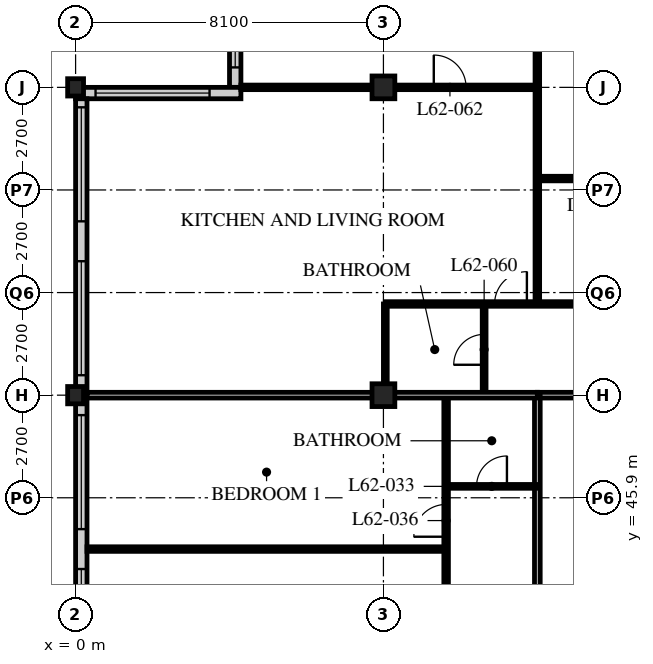
"""IFC4 building model, lengths in metres.
Left out: names, types, materials, properties, quantities, classifications, styles, units other than length and angle.
Written with IfcOpenShell. Run it as: python <this file> out.ifc"""

import sys

from ifc_helpers import new_model, si_unit, direction, frame, frame_2d, origin, origin_2d, place, context, subcontext, project, spatial, rectangle, hollow_rectangle, i_section, extrude, element, fill, save


model = new_model("IFC4")
c1 = context("Model", 3, precision=1e-05, world=origin(), true_north=direction((0.0, 1.0)))
c2 = subcontext(c1, "Body", "Model", "MODEL_VIEW")
j1 = project(units=[si_unit("LENGTHUNIT", "METRE"), si_unit("PLANEANGLEUNIT", "RADIAN")], contexts=[c1])
p1 = place(None, origin())
s1 = spatial("IfcSite", under=j1, at=p1, CompositionType="ELEMENT")
p2 = place(p1, origin())
s2 = spatial("IfcBuilding", under=s1, at=p2, CompositionType="ELEMENT")
p3 = place(p2, frame((0.0, 0.0, 242.4)))
s3 = spatial("IfcBuildingStorey", under=s2, at=p3, CompositionType="ELEMENT", Elevation=242.4)
for number, where, z_axis, x_axis in (
    (1, (0.0, 48.6, 0.0), (0.0, 0.0, 1.0), (1.0, 0.0, 0.0)),
    (2, (0.0, 56.7, 0.0), (0.0, 0.0, 1.0), (1.0, 0.0, 0.0)),
):
    element("IfcColumn", number, at=place(p3, frame(where, z_axis=z_axis, x_axis=x_axis)), inside=s3, PredefinedType="COLUMN", context=c2, shape_type="SweptSolid", body=[
        extrude(i_section(OverallWidth=0.418, OverallDepth=0.456, WebThickness=0.042, FlangeThickness=0.067, FilletRadius=0.015, at=origin_2d()), origin(), (0.0, 0.0, 1.0), 3.9),
    ])
for number, where, z_axis, x_axis in (
    (3, (8.1, 48.6, 0.0), (0.0, 0.0, 1.0), (1.0, 0.0, 0.0)),
    (4, (8.1, 56.7, 0.0), (0.0, 0.0, 1.0), (1.0, 0.0, 0.0)),
):
    element("IfcColumn", number, at=place(p3, frame(where, z_axis=z_axis, x_axis=x_axis)), inside=s3, PredefinedType="COLUMN", context=c2, shape_type="SweptSolid", body=[
        extrude(hollow_rectangle(XDim=0.6, YDim=0.6, WallThickness=0.05, at=origin_2d()), origin(), (0.0, 0.0, 1.0), 3.9),
    ])
p4 = place(p3, frame((4.2, 60.45, 0.0), z_axis=(0.0, 0.0, 1.0), x_axis=(0.0, -1.0, 0.0)))
e5 = element("IfcWall", 5, at=p4, inside=s3, PredefinedType="SOLIDWALL", context=c2, shape_type="SweptSolid", body=[
    extrude(rectangle(XDim=3.75, YDim=0.3, at=frame_2d((1.875, 0.0))), origin(), (0.0, 0.0, 1.0), 3.69),
])
p5 = place(p4, frame((0.225, 0.0, 0.6)))
e6 = element("IfcOpeningElement", 6, at=p5, cuts=e5, PredefinedType="OPENING", context=c2, shape_type="SweptSolid", body=[
    extrude(rectangle(XDim=3.0, YDim=2.3, at=frame_2d((1.5, 1.15))), frame((0.0, 0.16, 0.0), z_axis=(0.0, -1.0, 0.0), x_axis=(1.0, 0.0, 0.0)), (0.0, 0.0, 1.0), 0.32),
])
p6 = place(p3, frame((4.35, 56.55, 0.0), z_axis=(0.0, 0.0, 1.0), x_axis=(-1.0, 0.0, 0.0)))
e7 = element("IfcWall", 7, at=p6, inside=s3, PredefinedType="SOLIDWALL", context=c2, shape_type="SweptSolid", body=[
    extrude(rectangle(XDim=4.35, YDim=0.3, at=frame_2d((2.175, 0.0))), origin(), (0.0, 0.0, 1.0), 3.69),
])
p7 = place(p6, frame((0.825, 0.0, 0.6)))
e8 = element("IfcOpeningElement", 8, at=p7, cuts=e7, PredefinedType="OPENING", context=c2, shape_type="SweptSolid", body=[
    extrude(rectangle(XDim=3.0, YDim=2.3, at=frame_2d((1.5, 1.15))), frame((0.0, 0.16, 0.0), z_axis=(0.0, -1.0, 0.0), x_axis=(1.0, 0.0, 0.0)), (0.0, 0.0, 1.0), 0.32),
])
p8 = place(p3, frame((0.15, 56.4, 0.0), z_axis=(0.0, 0.0, 1.0), x_axis=(0.0, -1.0, 0.0)))
e9 = element("IfcWall", 9, at=p8, inside=s3, PredefinedType="SOLIDWALL", context=c2, shape_type="SweptSolid", body=[
    extrude(rectangle(XDim=32.1, YDim=0.3, at=frame_2d((16.05, 0.0))), origin(), (0.0, 0.0, 1.0), 3.69),
])
p9 = place(p8, frame((0.225, 0.0, 0.6)))
e10 = element("IfcOpeningElement", 10, at=p9, cuts=e9, PredefinedType="OPENING", context=c2, shape_type="SweptSolid", body=[
    extrude(rectangle(XDim=3.0, YDim=2.3, at=frame_2d((1.5, 1.15))), frame((0.0, 0.16, 0.0), z_axis=(0.0, -1.0, 0.0), x_axis=(1.0, 0.0, 0.0)), (0.0, 0.0, 1.0), 0.32),
])
p10 = place(p8, frame((4.275, 0.0, 0.6)))
e11 = element("IfcOpeningElement", 11, at=p10, cuts=e9, PredefinedType="OPENING", context=c2, shape_type="SweptSolid", body=[
    extrude(rectangle(XDim=3.0, YDim=2.3, at=frame_2d((1.5, 1.15))), frame((0.0, 0.16, 0.0), z_axis=(0.0, -1.0, 0.0), x_axis=(1.0, 0.0, 0.0)), (0.0, 0.0, 1.0), 0.32),
])
p11 = place(p8, frame((8.325, 0.0, 0.6)))
e12 = element("IfcOpeningElement", 12, at=p11, cuts=e9, PredefinedType="OPENING", context=c2, shape_type="SweptSolid", body=[
    extrude(rectangle(XDim=3.0, YDim=2.3, at=frame_2d((1.5, 1.15))), frame((0.0, 0.16, 0.0), z_axis=(0.0, -1.0, 0.0), x_axis=(1.0, 0.0, 0.0)), (0.0, 0.0, 1.0), 0.32),
])
p12 = place(p8, frame((12.375, 0.0, 0.6)))
e13 = element("IfcOpeningElement", 13, at=p12, cuts=e9, PredefinedType="OPENING", context=c2, shape_type="SweptSolid", body=[
    extrude(rectangle(XDim=3.0, YDim=2.3, at=frame_2d((1.5, 1.15))), frame((0.0, 0.16, 0.0), z_axis=(0.0, -1.0, 0.0), x_axis=(1.0, 0.0, 0.0)), (0.0, 0.0, 1.0), 0.32),
])
p13 = place(p8, frame((16.425, 0.0, 0.6)))
e14 = element("IfcOpeningElement", 14, at=p13, cuts=e9, PredefinedType="OPENING", context=c2, shape_type="SweptSolid", body=[
    extrude(rectangle(XDim=3.0, YDim=2.3, at=frame_2d((1.5, 1.15))), frame((0.0, 0.16, 0.0), z_axis=(0.0, -1.0, 0.0), x_axis=(1.0, 0.0, 0.0)), (0.0, 0.0, 1.0), 0.32),
])
p14 = place(p8, frame((20.475, 0.0, 0.6)))
e15 = element("IfcOpeningElement", 15, at=p14, cuts=e9, PredefinedType="OPENING", context=c2, shape_type="SweptSolid", body=[
    extrude(rectangle(XDim=3.0, YDim=2.3, at=frame_2d((1.5, 1.15))), frame((0.0, 0.16, 0.0), z_axis=(0.0, -1.0, 0.0), x_axis=(1.0, 0.0, 0.0)), (0.0, 0.0, 1.0), 0.32),
])
p15 = place(p8, frame((24.525, 0.0, 0.6)))
e16 = element("IfcOpeningElement", 16, at=p15, cuts=e9, PredefinedType="OPENING", context=c2, shape_type="SweptSolid", body=[
    extrude(rectangle(XDim=3.0, YDim=2.3, at=frame_2d((1.5, 1.15))), frame((0.0, 0.16, 0.0), z_axis=(0.0, -1.0, 0.0), x_axis=(1.0, 0.0, 0.0)), (0.0, 0.0, 1.0), 0.32),
])
p16 = place(p8, frame((28.575, 0.0, 0.6)))
e17 = element("IfcOpeningElement", 17, at=p16, cuts=e9, PredefinedType="OPENING", context=c2, shape_type="SweptSolid", body=[
    extrude(rectangle(XDim=3.0, YDim=2.3, at=frame_2d((1.5, 1.15))), frame((0.0, 0.16, 0.0), z_axis=(0.0, -1.0, 0.0), x_axis=(1.0, 0.0, 0.0)), (0.0, 0.0, 1.0), 0.32),
])
p17 = place(p3, frame((12.15, 48.6, 0.0), z_axis=(0.0, 0.0, 1.0), x_axis=(1.0, 0.0, 0.0)))
e18 = element("IfcWall", 18, at=p17, inside=s3, PredefinedType="PARTITIONING", context=c2, shape_type="SweptSolid", body=[
    extrude(rectangle(XDim=32.4, YDim=0.15, at=frame_2d((16.2, 0.0))), origin(), (0.0, 0.0, 1.0), 2.928),
])
p18 = place(p17, frame((4.95, 0.0, 0.0)))
e19 = element("IfcOpeningElement", 19, at=p18, cuts=e18, PredefinedType="OPENING", context=c2, shape_type="SweptSolid", body=[
    extrude(rectangle(XDim=1.0, YDim=2.1, at=frame_2d((0.5, 1.05))), frame((0.0, 0.085, 0.0), z_axis=(0.0, -1.0, 0.0), x_axis=(1.0, 0.0, 0.0)), (0.0, 0.0, 1.0), 0.17),
])
p19 = place(p17, frame((21.15, 0.0, 0.0)))
e20 = element("IfcOpeningElement", 20, at=p19, cuts=e18, PredefinedType="OPENING", context=c2, shape_type="SweptSolid", body=[
    extrude(rectangle(XDim=1.0, YDim=2.1, at=frame_2d((0.5, 1.05))), frame((0.0, 0.085, 0.0), z_axis=(0.0, -1.0, 0.0), x_axis=(1.0, 0.0, 0.0)), (0.0, 0.0, 1.0), 0.17),
])
p20 = place(p17, frame((29.875, 0.0, 0.0)))
e21 = element("IfcOpeningElement", 21, at=p20, cuts=e18, PredefinedType="OPENING", context=c2, shape_type="SweptSolid", body=[
    extrude(rectangle(XDim=1.0, YDim=2.1, at=frame_2d((0.5, 1.05))), frame((0.0, 0.085, 0.0), z_axis=(0.0, -1.0, 0.0), x_axis=(1.0, 0.0, 0.0)), (0.0, 0.0, 1.0), 0.17),
])
p21 = place(p17, frame((1.525, 0.0, 0.0)))
e22 = element("IfcOpeningElement", 22, at=p21, cuts=e18, PredefinedType="OPENING", context=c2, shape_type="SweptSolid", body=[
    extrude(rectangle(XDim=1.0, YDim=2.1, at=frame_2d((0.5, 1.05))), frame((0.0, 0.085, 0.0), z_axis=(0.0, -1.0, 0.0), x_axis=(1.0, 0.0, 0.0)), (0.0, 0.0, 1.0), 0.17),
])
p22 = place(p3, frame((12.15, 22.5, 0.0), z_axis=(0.0, 0.0, 1.0), x_axis=(0.0, 1.0, 0.0)))
e23 = element("IfcWall", 23, at=p22, inside=s3, PredefinedType="PARTITIONING", context=c2, shape_type="SweptSolid", body=[
    extrude(rectangle(XDim=26.1, YDim=0.15, at=frame_2d((13.05, 0.0))), origin(), (0.0, 0.0, 1.0), 3.69),
])
p23 = place(p22, frame((0.4, 0.0, 0.0)))
e24 = element("IfcOpeningElement", 24, at=p23, cuts=e23, PredefinedType="OPENING", context=c2, shape_type="SweptSolid", body=[
    extrude(rectangle(XDim=1.0, YDim=2.1, at=frame_2d((0.5, 1.05))), frame((0.0, 0.085, 0.0), z_axis=(0.0, -1.0, 0.0), x_axis=(1.0, 0.0, 0.0)), (0.0, 0.0, 1.0), 0.17),
])
p24 = place(p22, frame((14.35, 0.0, 0.0)))
e25 = element("IfcOpeningElement", 25, at=p24, cuts=e23, PredefinedType="OPENING", context=c2, shape_type="SweptSolid", body=[
    extrude(rectangle(XDim=1.0, YDim=2.1, at=frame_2d((0.5, 1.05))), frame((0.0, 0.085, 0.0), z_axis=(0.0, -1.0, 0.0), x_axis=(1.0, 0.0, 0.0)), (0.0, 0.0, 1.0), 0.17),
])
p25 = place(p3, frame((9.75, 22.5, 0.0), z_axis=(0.0, 0.0, 1.0), x_axis=(0.0, 1.0, 0.0)))
e26 = element("IfcWall", 26, at=p25, inside=s3, PredefinedType="PARTITIONING", context=c2, shape_type="SweptSolid", body=[
    extrude(rectangle(XDim=26.1, YDim=0.12, at=frame_2d((13.05, 0.0))), origin(), (0.0, 0.0, 1.0), 3.69),
])
p26 = place(p25, frame((0.975, 0.0, 0.0)))
e27 = element("IfcOpeningElement", 27, at=p26, cuts=e26, PredefinedType="OPENING", context=c2, shape_type="SweptSolid", body=[
    extrude(rectangle(XDim=0.85, YDim=2.1, at=frame_2d((0.425, 1.05))), frame((0.0, 0.07, 0.0), z_axis=(0.0, -1.0, 0.0), x_axis=(1.0, 0.0, 0.0)), (0.0, 0.0, 1.0), 0.14),
])
p27 = place(p25, frame((10.225, 0.0, 0.0)))
e28 = element("IfcOpeningElement", 28, at=p27, cuts=e26, PredefinedType="OPENING", context=c2, shape_type="SweptSolid", body=[
    extrude(rectangle(XDim=0.85, YDim=2.1, at=frame_2d((0.425, 1.05))), frame((0.0, 0.07, 0.0), z_axis=(0.0, -1.0, 0.0), x_axis=(1.0, 0.0, 0.0)), (0.0, 0.0, 1.0), 0.14),
])
p28 = place(p25, frame((14.925, 0.0, 0.0)))
e29 = element("IfcOpeningElement", 29, at=p28, cuts=e26, PredefinedType="OPENING", context=c2, shape_type="SweptSolid", body=[
    extrude(rectangle(XDim=0.85, YDim=2.1, at=frame_2d((0.425, 1.05))), frame((0.0, 0.07, 0.0), z_axis=(0.0, -1.0, 0.0), x_axis=(1.0, 0.0, 0.0)), (0.0, 0.0, 1.0), 0.14),
])
p29 = place(p25, frame((22.375, 0.0, 0.0)))
e30 = element("IfcOpeningElement", 30, at=p29, cuts=e26, PredefinedType="OPENING", context=c2, shape_type="SweptSolid", body=[
    extrude(rectangle(XDim=0.85, YDim=2.1, at=frame_2d((0.425, 1.05))), frame((0.0, 0.07, 0.0), z_axis=(0.0, -1.0, 0.0), x_axis=(1.0, 0.0, 0.0)), (0.0, 0.0, 1.0), 0.14),
])
p30 = place(p3, frame((12.15, 46.2, 0.0), z_axis=(0.0, 0.0, 1.0), x_axis=(-1.0, 0.0, 0.0)))
e31 = element("IfcWall", 31, at=p30, inside=s3, PredefinedType="PARTITIONING", context=c2, shape_type="SweptSolid", body=[
    extrude(rectangle(XDim=2.4, YDim=0.1, at=frame_2d((1.2, 0.0))), origin(), (0.0, 0.0, 1.0), 3.69),
])
p31 = place(p30, frame((0.8, 0.0, 0.0)))
e32 = element("IfcOpeningElement", 32, at=p31, cuts=e31, PredefinedType="OPENING", context=c2, shape_type="SweptSolid", body=[
    extrude(rectangle(XDim=0.8, YDim=2.1, at=frame_2d((0.4, 1.05))), frame((0.0, 0.06, 0.0), z_axis=(0.0, -1.0, 0.0), x_axis=(1.0, 0.0, 0.0)), (0.0, 0.0, 1.0), 0.12),
])
p32 = place(p3, frame((9.75, 44.55, 0.0), z_axis=(0.0, 0.0, 1.0), x_axis=(-1.0, 0.0, 0.0)))
e33 = element("IfcWall", 33, at=p32, inside=s3, PredefinedType="PARTITIONING", context=c2, shape_type="SweptSolid", body=[
    extrude(rectangle(XDim=9.45, YDim=0.12, at=frame_2d((4.725, 0.0))), origin(), (0.0, 0.0, 1.0), 3.69),
])
p33 = place(p3, frame((10.75, 48.6, 0.0), z_axis=(0.0, 0.0, 1.0), x_axis=(0.0, 1.0, 0.0)))
e34 = element("IfcWall", 34, at=p33, inside=s3, PredefinedType="PARTITIONING", context=c2, shape_type="SweptSolid", body=[
    extrude(rectangle(XDim=2.4, YDim=0.1, at=frame_2d((1.2, 0.0))), origin(), (0.0, 0.0, 1.0), 3.69),
])
p34 = place(p33, frame((0.8, 0.0, 0.0)))
e35 = element("IfcOpeningElement", 35, at=p34, cuts=e34, PredefinedType="OPENING", context=c2, shape_type="SweptSolid", body=[
    extrude(rectangle(XDim=0.8, YDim=2.1, at=frame_2d((0.4, 1.05))), frame((0.0, 0.06, 0.0), z_axis=(0.0, -1.0, 0.0), x_axis=(1.0, 0.0, 0.0)), (0.0, 0.0, 1.0), 0.12),
])
p35 = place(p3, frame((8.15, 48.6, 0.0), z_axis=(0.0, 0.0, 1.0), x_axis=(0.0, 1.0, 0.0)))
e36 = element("IfcWall", 36, at=p35, inside=s3, PredefinedType="PARTITIONING", context=c2, shape_type="SweptSolid", body=[
    extrude(rectangle(XDim=2.4, YDim=0.1, at=frame_2d((1.2, 0.0))), origin(), (0.0, 0.0, 1.0), 2.928),
])
p36 = place(p3, frame((8.15, 51.0, 0.0), z_axis=(0.0, 0.0, 1.0), x_axis=(1.0, 0.0, 0.0)))
e37 = element("IfcWall", 37, at=p36, inside=s3, PredefinedType="PARTITIONING", context=c2, shape_type="SweptSolid", body=[
    extrude(rectangle(XDim=40.4, YDim=0.12, at=frame_2d((20.2, 0.0))), origin(), (0.0, 0.0, 1.0), 3.69),
])
p37 = place(p36, frame((9.025, 0.0, 0.0)))
e38 = element("IfcOpeningElement", 38, at=p37, cuts=e37, PredefinedType="OPENING", context=c2, shape_type="SweptSolid", body=[
    extrude(rectangle(XDim=0.85, YDim=2.1, at=frame_2d((0.425, 1.05))), frame((0.0, 0.07, 0.0), z_axis=(0.0, -1.0, 0.0), x_axis=(1.0, 0.0, 0.0)), (0.0, 0.0, 1.0), 0.14),
])
p38 = place(p36, frame((16.475, 0.0, 0.0)))
e39 = element("IfcOpeningElement", 39, at=p38, cuts=e37, PredefinedType="OPENING", context=c2, shape_type="SweptSolid", body=[
    extrude(rectangle(XDim=0.85, YDim=2.1, at=frame_2d((0.425, 1.05))), frame((0.0, 0.07, 0.0), z_axis=(0.0, -1.0, 0.0), x_axis=(1.0, 0.0, 0.0)), (0.0, 0.0, 1.0), 0.14),
])
p39 = place(p36, frame((20.525, 0.0, 0.0)))
e40 = element("IfcOpeningElement", 40, at=p39, cuts=e37, PredefinedType="OPENING", context=c2, shape_type="SweptSolid", body=[
    extrude(rectangle(XDim=0.85, YDim=2.1, at=frame_2d((0.425, 1.05))), frame((0.0, 0.07, 0.0), z_axis=(0.0, -1.0, 0.0), x_axis=(1.0, 0.0, 0.0)), (0.0, 0.0, 1.0), 0.14),
])
p40 = place(p36, frame((25.225, 0.0, 0.0)))
e41 = element("IfcOpeningElement", 41, at=p40, cuts=e37, PredefinedType="OPENING", context=c2, shape_type="SweptSolid", body=[
    extrude(rectangle(XDim=0.85, YDim=2.1, at=frame_2d((0.425, 1.05))), frame((0.0, 0.07, 0.0), z_axis=(0.0, -1.0, 0.0), x_axis=(1.0, 0.0, 0.0)), (0.0, 0.0, 1.0), 0.14),
])
p41 = place(p36, frame((28.625, 0.0, 0.0)))
e42 = element("IfcOpeningElement", 42, at=p41, cuts=e37, PredefinedType="OPENING", context=c2, shape_type="SweptSolid", body=[
    extrude(rectangle(XDim=0.85, YDim=2.1, at=frame_2d((0.425, 1.05))), frame((0.0, 0.07, 0.0), z_axis=(0.0, -1.0, 0.0), x_axis=(1.0, 0.0, 0.0)), (0.0, 0.0, 1.0), 0.14),
])
p42 = place(p36, frame((32.825, 0.0, 0.0)))
e43 = element("IfcOpeningElement", 43, at=p42, cuts=e37, PredefinedType="OPENING", context=c2, shape_type="SweptSolid", body=[
    extrude(rectangle(XDim=0.85, YDim=2.1, at=frame_2d((0.425, 1.05))), frame((0.0, 0.07, 0.0), z_axis=(0.0, -1.0, 0.0), x_axis=(1.0, 0.0, 0.0)), (0.0, 0.0, 1.0), 0.14),
])
p43 = place(p36, frame((36.675, 0.0, 0.0)))
e44 = element("IfcOpeningElement", 44, at=p43, cuts=e37, PredefinedType="OPENING", context=c2, shape_type="SweptSolid", body=[
    extrude(rectangle(XDim=0.85, YDim=2.1, at=frame_2d((0.425, 1.05))), frame((0.0, 0.07, 0.0), z_axis=(0.0, -1.0, 0.0), x_axis=(1.0, 0.0, 0.0)), (0.0, 0.0, 1.0), 0.14),
])
p44 = place(p36, frame((6.725, 0.0, 0.0)))
e45 = element("IfcOpeningElement", 45, at=p44, cuts=e37, PredefinedType="OPENING", context=c2, shape_type="SweptSolid", body=[
    extrude(rectangle(XDim=0.85, YDim=2.1, at=frame_2d((0.425, 1.05))), frame((0.0, 0.07, 0.0), z_axis=(0.0, -1.0, 0.0), x_axis=(1.0, 0.0, 0.0)), (0.0, 0.0, 1.0), 0.14),
])
p45 = place(p36, frame((2.875, 0.0, 0.0)))
e46 = element("IfcOpeningElement", 46, at=p45, cuts=e37, PredefinedType="OPENING", context=c2, shape_type="SweptSolid", body=[
    extrude(rectangle(XDim=0.85, YDim=2.1, at=frame_2d((0.425, 1.05))), frame((0.0, 0.07, 0.0), z_axis=(0.0, -1.0, 0.0), x_axis=(1.0, 0.0, 0.0)), (0.0, 0.0, 1.0), 0.14),
])
p46 = place(p3, frame((12.15, 51.0, 0.0), z_axis=(0.0, 0.0, 1.0), x_axis=(0.0, 1.0, 0.0)))
e47 = element("IfcWall", 47, at=p46, inside=s3, PredefinedType="PARTITIONING", context=c2, shape_type="SweptSolid", body=[
    extrude(rectangle(XDim=13.5, YDim=0.12, at=frame_2d((6.75, 0.0))), origin(), (0.0, 0.0, 1.0), 3.69),
])
p47 = place(p3, frame((12.15, 56.7, 0.0), z_axis=(0.0, 0.0, 1.0), x_axis=(-1.0, 0.0, 0.0)))
e48 = element("IfcWall", 48, at=p47, inside=s3, PredefinedType="PARTITIONING", context=c2, shape_type="SweptSolid", body=[
    extrude(rectangle(XDim=7.8, YDim=0.12, at=frame_2d((3.9, 0.0))), origin(), (0.0, 0.0, 1.0), 2.928),
])
p48 = place(p47, frame((1.875, 0.0, 0.0)))
e49 = element("IfcOpeningElement", 49, at=p48, cuts=e48, PredefinedType="OPENING", context=c2, shape_type="SweptSolid", body=[
    extrude(rectangle(XDim=0.85, YDim=2.1, at=frame_2d((0.425, 1.05))), frame((0.0, 0.07, 0.0), z_axis=(0.0, -1.0, 0.0), x_axis=(1.0, 0.0, 0.0)), (0.0, 0.0, 1.0), 0.14),
])
p49 = place(p3, frame((0.3, 48.6, 0.0), z_axis=(0.0, 0.0, 1.0), x_axis=(1.0, 0.0, 0.0)))
e50 = element("IfcWall", 50, at=p49, inside=s3, PredefinedType="PARTITIONING", context=c2, shape_type="SweptSolid", body=[
    extrude(rectangle(XDim=11.85, YDim=0.15, at=frame_2d((5.925, 0.0))), origin(), (0.0, 0.0, 1.0), 2.928),
])
p50 = place(p3, frame((12.15, 54.3, 0.0), z_axis=(0.0, 0.0, 1.0), x_axis=(1.0, 0.0, 0.0)))
e51 = element("IfcWall", 51, at=p50, inside=s3, PredefinedType="PARTITIONING", context=c2, shape_type="SweptSolid", body=[
    extrude(rectangle(XDim=4.05, YDim=0.12, at=frame_2d((2.025, 0.0))), origin(), (0.0, 0.0, 1.0), 3.69),
])
p51 = place(p50, frame((1.6, 0.0, 0.0)))
e52 = element("IfcOpeningElement", 52, at=p51, cuts=e51, PredefinedType="OPENING", context=c2, shape_type="SweptSolid", body=[
    extrude(rectangle(XDim=0.85, YDim=2.1, at=frame_2d((0.425, 1.05))), frame((0.0, 0.07, 0.0), z_axis=(0.0, -1.0, 0.0), x_axis=(1.0, 0.0, 0.0)), (0.0, 0.0, 1.0), 0.14),
])
p52 = place(p5, origin())
e53 = element("IfcWindow", 53, at=p52, inside=s3, PartitioningType="SINGLE_PANEL", PredefinedType="WINDOW", context=c2, shape_type="SweptSolid", body=[
    extrude(rectangle(XDim=3.0, YDim=2.3, at=frame_2d((1.5, 1.15))), frame((0.0, 0.03, 0.0), z_axis=(0.0, -1.0, 0.0), x_axis=(1.0, 0.0, 0.0)), (0.0, 0.0, 1.0), 0.06),
])
fill(e6, e53)
p53 = place(p7, origin())
e54 = element("IfcWindow", 54, at=p53, inside=s3, PartitioningType="SINGLE_PANEL", PredefinedType="WINDOW", context=c2, shape_type="SweptSolid", body=[
    extrude(rectangle(XDim=3.0, YDim=2.3, at=frame_2d((1.5, 1.15))), frame((0.0, 0.03, 0.0), z_axis=(0.0, -1.0, 0.0), x_axis=(1.0, 0.0, 0.0)), (0.0, 0.0, 1.0), 0.06),
])
fill(e8, e54)
p54 = place(p9, origin())
e55 = element("IfcWindow", 55, at=p54, inside=s3, PartitioningType="SINGLE_PANEL", PredefinedType="WINDOW", context=c2, shape_type="SweptSolid", body=[
    extrude(rectangle(XDim=3.0, YDim=2.3, at=frame_2d((1.5, 1.15))), frame((0.0, 0.03, 0.0), z_axis=(0.0, -1.0, 0.0), x_axis=(1.0, 0.0, 0.0)), (0.0, 0.0, 1.0), 0.06),
])
fill(e10, e55)
p55 = place(p10, origin())
e56 = element("IfcWindow", 56, at=p55, inside=s3, PartitioningType="SINGLE_PANEL", PredefinedType="WINDOW", context=c2, shape_type="SweptSolid", body=[
    extrude(rectangle(XDim=3.0, YDim=2.3, at=frame_2d((1.5, 1.15))), frame((0.0, 0.03, 0.0), z_axis=(0.0, -1.0, 0.0), x_axis=(1.0, 0.0, 0.0)), (0.0, 0.0, 1.0), 0.06),
])
fill(e11, e56)
p56 = place(p11, origin())
e57 = element("IfcWindow", 57, at=p56, inside=s3, PartitioningType="SINGLE_PANEL", PredefinedType="WINDOW", context=c2, shape_type="SweptSolid", body=[
    extrude(rectangle(XDim=3.0, YDim=2.3, at=frame_2d((1.5, 1.15))), frame((0.0, 0.03, 0.0), z_axis=(0.0, -1.0, 0.0), x_axis=(1.0, 0.0, 0.0)), (0.0, 0.0, 1.0), 0.06),
])
fill(e12, e57)
p57 = place(p12, origin())
e58 = element("IfcWindow", 58, at=p57, inside=s3, PartitioningType="SINGLE_PANEL", PredefinedType="WINDOW", context=c2, shape_type="SweptSolid", body=[
    extrude(rectangle(XDim=3.0, YDim=2.3, at=frame_2d((1.5, 1.15))), frame((0.0, 0.03, 0.0), z_axis=(0.0, -1.0, 0.0), x_axis=(1.0, 0.0, 0.0)), (0.0, 0.0, 1.0), 0.06),
])
fill(e13, e58)
p58 = place(p31, origin())
e59 = element("IfcDoor", 59, at=p58, inside=s3, OperationType="SINGLE_SWING_RIGHT", PredefinedType="DOOR", context=c2, shape_type="SweptSolid", body=[
    extrude(rectangle(XDim=0.8, YDim=2.1, at=frame_2d((0.4, 1.05))), frame((0.0, 0.025, 0.0), z_axis=(0.0, -1.0, 0.0), x_axis=(1.0, 0.0, 0.0)), (0.0, 0.0, 1.0), 0.05),
])
fill(e32, e59)
p59 = place(p29, origin())
e60 = element("IfcDoor", 60, at=p59, inside=s3, OperationType="SINGLE_SWING_LEFT", PredefinedType="DOOR", context=c2, shape_type="SweptSolid", body=[
    extrude(rectangle(XDim=0.85, YDim=2.1, at=frame_2d((0.425, 1.05))), frame((0.0, 0.025, 0.0), z_axis=(0.0, -1.0, 0.0), x_axis=(1.0, 0.0, 0.0)), (0.0, 0.0, 1.0), 0.05),
])
fill(e30, e60)
p60 = place(p34, origin())
e61 = element("IfcDoor", 61, at=p60, inside=s3, OperationType="SINGLE_SWING_LEFT", PredefinedType="DOOR", context=c2, shape_type="SweptSolid", body=[
    extrude(rectangle(XDim=0.8, YDim=2.1, at=frame_2d((0.4, 1.05))), frame((0.0, 0.025, 0.0), z_axis=(0.0, -1.0, 0.0), x_axis=(1.0, 0.0, 0.0)), (0.0, 0.0, 1.0), 0.05),
])
fill(e35, e61)
p61 = place(p45, origin())
e62 = element("IfcDoor", 62, at=p61, inside=s3, OperationType="SINGLE_SWING_RIGHT", PredefinedType="DOOR", context=c2, shape_type="SweptSolid", body=[
    extrude(rectangle(XDim=0.85, YDim=2.1, at=frame_2d((0.425, 1.05))), frame((0.0, 0.025, 0.0), z_axis=(0.0, -1.0, 0.0), x_axis=(1.0, 0.0, 0.0)), (0.0, 0.0, 1.0), 0.05),
])
fill(e46, e62)
p62 = place(p48, origin())
e63 = element("IfcDoor", 63, at=p62, inside=s3, OperationType="SINGLE_SWING_LEFT", PredefinedType="DOOR", context=c2, shape_type="SweptSolid", body=[
    extrude(rectangle(XDim=0.85, YDim=2.1, at=frame_2d((0.425, 1.05))), frame((0.0, 0.025, 0.0), z_axis=(0.0, -1.0, 0.0), x_axis=(1.0, 0.0, 0.0)), (0.0, 0.0, 1.0), 0.05),
])
fill(e49, e63)
save(model, sys.argv[1])
